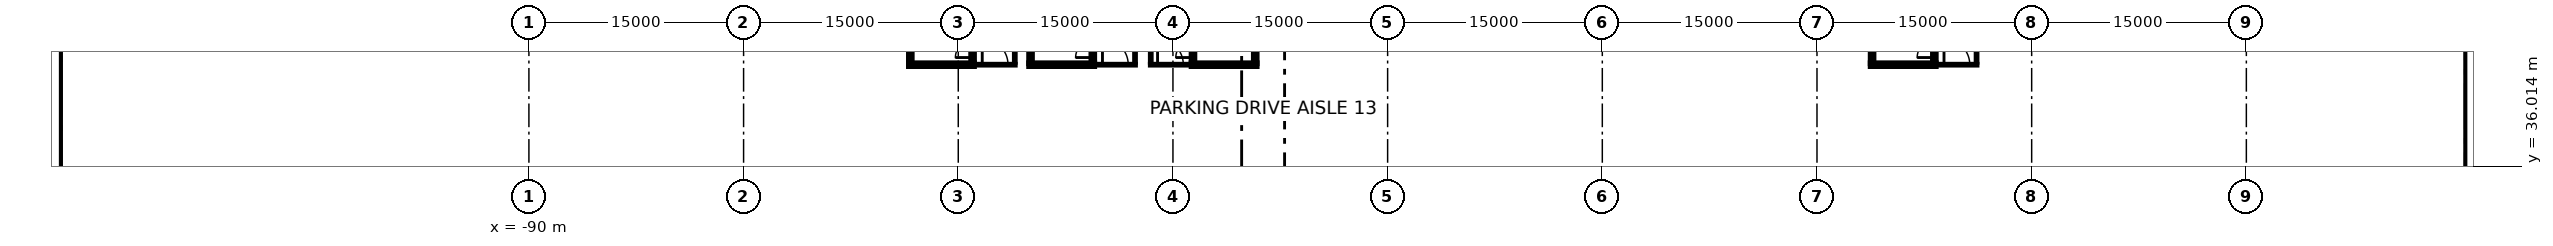
"""IFC4 building model, lengths in metres.
Left out: names, types, materials, properties, quantities, classifications, styles, units other than length and angle.
Written with IfcOpenShell. Run it as: python <this file> out.ifc"""

import sys

from ifc_helpers import new_model, si_unit, direction, frame, frame_2d, origin, place, context, subcontext, project, spatial, rectangle, extrude, element, fill, save


model = new_model("IFC4")
c1 = context("Model", 3, precision=1e-05, world=origin(), true_north=direction((0.0, 1.0)))
c2 = subcontext(c1, "Body", "Model", "MODEL_VIEW")
j1 = project(units=[si_unit("LENGTHUNIT", "METRE"), si_unit("PLANEANGLEUNIT", "RADIAN")], contexts=[c1])
p1 = place(None, origin())
s1 = spatial("IfcSite", under=j1, at=p1, CompositionType="ELEMENT")
p2 = place(p1, origin())
s2 = spatial("IfcBuilding", under=s1, at=p2, CompositionType="ELEMENT")
p3 = place(p2, frame((0.0, 0.0, -12.0)))
s3 = spatial("IfcBuildingStorey", under=s2, at=p3, CompositionType="ELEMENT", Elevation=-12.0)
for number, where, z_axis, x_axis in (
    (1, (-123.15, -80.0, 0.0), (0.0, 0.0, 1.0), (0.0, 1.0, 0.0)),
    (2, (45.75, -80.0, 0.0), (0.0, 0.0, 1.0), (0.0, 1.0, 0.0)),
):
    element("IfcWall", number, at=place(p3, frame(where, z_axis=z_axis, x_axis=x_axis)), inside=s3, PredefinedType="USERDEFINED", context=c2, shape_type="SweptSolid", body=[
        extrude(rectangle(XDim=160.0, YDim=0.9, at=frame_2d((80.0, 0.0))), origin(), (0.0, 0.0, 1.0), 11.55),
    ])
p4 = place(p2, frame((0.0, 0.0, -3.6)))
s4 = spatial("IfcBuildingStorey", under=s2, at=p4, CompositionType="ELEMENT", Elevation=-3.6)
p5 = place(p4, frame((-58.9, 43.1, 0.0), z_axis=(0.0, 0.0, 1.0), x_axis=(1.0, 0.0, 0.0)))
e3 = element("IfcWall", 3, at=p5, inside=s4, PredefinedType="PARTITIONING", context=c2, shape_type="SweptSolid", body=[
    extrude(rectangle(XDim=2.95, YDim=0.2, at=frame_2d((1.475, 0.0))), origin(), (0.0, 0.0, 1.0), 3.15),
])
p6 = place(p5, frame((0.575, 0.0, 0.0)))
e4 = element("IfcOpeningElement", 4, at=p6, cuts=e3, PredefinedType="OPENING", context=c2, shape_type="SweptSolid", body=[
    extrude(rectangle(XDim=1.8, YDim=2.1, at=frame_2d((0.9, 1.05))), frame((0.0, 0.11, 0.0), z_axis=(0.0, -1.0, 0.0), x_axis=(1.0, 0.0, 0.0)), (0.0, 0.0, 1.0), 0.22),
])
p7 = place(p4, frame((-56.05, 43.2, 0.0), z_axis=(0.0, 0.0, 1.0), x_axis=(0.0, 1.0, 0.0)))
e5 = element("IfcWall", 5, at=p7, inside=s4, PredefinedType="PARTITIONING", context=c2, shape_type="SweptSolid", body=[
    extrude(rectangle(XDim=3.6, YDim=0.2, at=frame_2d((1.8, 0.0))), origin(), (0.0, 0.0, 1.0), 3.15),
])
p8 = place(p4, frame((-50.5, 43.1, 0.0), z_axis=(0.0, 0.0, 1.0), x_axis=(1.0, 0.0, 0.0)))
e6 = element("IfcWall", 6, at=p8, inside=s4, PredefinedType="PARTITIONING", context=c2, shape_type="SweptSolid", body=[
    extrude(rectangle(XDim=2.95, YDim=0.2, at=frame_2d((1.475, 0.0))), origin(), (0.0, 0.0, 1.0), 3.15),
])
p9 = place(p8, frame((0.575, 0.0, 0.0)))
e7 = element("IfcOpeningElement", 7, at=p9, cuts=e6, PredefinedType="OPENING", context=c2, shape_type="SweptSolid", body=[
    extrude(rectangle(XDim=1.8, YDim=2.1, at=frame_2d((0.9, 1.05))), frame((0.0, 0.11, 0.0), z_axis=(0.0, -1.0, 0.0), x_axis=(1.0, 0.0, 0.0)), (0.0, 0.0, 1.0), 0.22),
])
p10 = place(p4, frame((-47.65, 43.2, 0.0), z_axis=(0.0, 0.0, 1.0), x_axis=(0.0, 1.0, 0.0)))
e8 = element("IfcWall", 8, at=p10, inside=s4, PredefinedType="PARTITIONING", context=c2, shape_type="SweptSolid", body=[
    extrude(rectangle(XDim=3.6, YDim=0.2, at=frame_2d((1.8, 0.0))), origin(), (0.0, 0.0, 1.0), 3.15),
])
p11 = place(p4, frame((8.3, 43.1, 0.0), z_axis=(0.0, 0.0, 1.0), x_axis=(1.0, 0.0, 0.0)))
e9 = element("IfcWall", 9, at=p11, inside=s4, PredefinedType="PARTITIONING", context=c2, shape_type="SweptSolid", body=[
    extrude(rectangle(XDim=2.95, YDim=0.2, at=frame_2d((1.475, 0.0))), origin(), (0.0, 0.0, 1.0), 3.15),
])
p12 = place(p11, frame((0.575, 0.0, 0.0)))
e10 = element("IfcOpeningElement", 10, at=p12, cuts=e9, PredefinedType="OPENING", context=c2, shape_type="SweptSolid", body=[
    extrude(rectangle(XDim=1.8, YDim=2.1, at=frame_2d((0.9, 1.05))), frame((0.0, 0.11, 0.0), z_axis=(0.0, -1.0, 0.0), x_axis=(1.0, 0.0, 0.0)), (0.0, 0.0, 1.0), 0.22),
])
p13 = place(p4, frame((11.15, 43.2, 0.0), z_axis=(0.0, 0.0, 1.0), x_axis=(0.0, 1.0, 0.0)))
e11 = element("IfcWall", 11, at=p13, inside=s4, PredefinedType="PARTITIONING", context=c2, shape_type="SweptSolid", body=[
    extrude(rectangle(XDim=3.6, YDim=0.2, at=frame_2d((1.8, 0.0))), origin(), (0.0, 0.0, 1.0), 3.15),
])
p14 = place(p4, frame((-46.65, 43.1, 0.0), z_axis=(0.0, 0.0, 1.0), x_axis=(1.0, 0.0, 0.0)))
e12 = element("IfcWall", 12, at=p14, inside=s4, PredefinedType="PARTITIONING", context=c2, shape_type="SweptSolid", body=[
    extrude(rectangle(XDim=2.95, YDim=0.2, at=frame_2d((1.475, 0.0))), origin(), (0.0, 0.0, 1.0), 3.15),
])
p15 = place(p14, frame((0.575, 0.0, 0.0)))
e13 = element("IfcOpeningElement", 13, at=p15, cuts=e12, PredefinedType="OPENING", context=c2, shape_type="SweptSolid", body=[
    extrude(rectangle(XDim=1.8, YDim=2.1, at=frame_2d((0.9, 1.05))), frame((0.0, 0.11, 0.0), z_axis=(0.0, -1.0, 0.0), x_axis=(1.0, 0.0, 0.0)), (0.0, 0.0, 1.0), 0.22),
])
p16 = place(p4, frame((-46.55, 43.2, 0.0), z_axis=(0.0, 0.0, 1.0), x_axis=(0.0, 1.0, 0.0)))
e14 = element("IfcWall", 14, at=p16, inside=s4, PredefinedType="PARTITIONING", context=c2, shape_type="SweptSolid", body=[
    extrude(rectangle(XDim=3.6, YDim=0.2, at=frame_2d((1.8, 0.0))), origin(), (0.0, 0.0, 1.0), 3.15),
])
p17 = place(p4, frame((-63.35, 43.2, 0.0), z_axis=(0.0, 0.0, 1.0), x_axis=(0.0, 1.0, 0.0)))
e15 = element("IfcWall", 15, at=p17, inside=s4, PredefinedType="SOLIDWALL", context=c2, shape_type="SweptSolid", body=[
    extrude(rectangle(XDim=9.6, YDim=0.2, at=frame_2d((4.8, 0.0))), origin(), (0.0, 0.0, 1.0), 3.15),
])
p18 = place(p4, frame((-59.0, 43.2, 0.0), z_axis=(0.0, 0.0, 1.0), x_axis=(0.0, 1.0, 0.0)))
e16 = element("IfcWall", 16, at=p18, inside=s4, PredefinedType="SOLIDWALL", context=c2, shape_type="SweptSolid", body=[
    extrude(rectangle(XDim=9.6, YDim=0.2, at=frame_2d((4.8, 0.0))), origin(), (0.0, 0.0, 1.0), 3.15),
])
p19 = place(p18, frame((0.4, 0.0, 0.0)))
e17 = element("IfcOpeningElement", 17, at=p19, cuts=e16, PredefinedType="OPENING", context=c2, shape_type="SweptSolid", body=[
    extrude(rectangle(XDim=1.2, YDim=2.1, at=frame_2d((0.6, 1.05))), frame((0.0, 0.11, 0.0), z_axis=(0.0, -1.0, 0.0), x_axis=(1.0, 0.0, 0.0)), (0.0, 0.0, 1.0), 0.22),
])
p20 = place(p4, frame((-58.9, 43.1, 0.0), z_axis=(0.0, 0.0, 1.0), x_axis=(-1.0, 0.0, 0.0)))
e18 = element("IfcWall", 18, at=p20, inside=s4, PredefinedType="SOLIDWALL", context=c2, shape_type="SweptSolid", body=[
    extrude(rectangle(XDim=4.55, YDim=0.2, at=frame_2d((2.275, 0.0))), origin(), (0.0, 0.0, 1.0), 3.15),
])
p21 = place(p4, frame((-54.95, 43.2, 0.0), z_axis=(0.0, 0.0, 1.0), x_axis=(0.0, 1.0, 0.0)))
e19 = element("IfcWall", 19, at=p21, inside=s4, PredefinedType="SOLIDWALL", context=c2, shape_type="SweptSolid", body=[
    extrude(rectangle(XDim=9.6, YDim=0.2, at=frame_2d((4.8, 0.0))), origin(), (0.0, 0.0, 1.0), 3.15),
])
p22 = place(p4, frame((-50.6, 43.2, 0.0), z_axis=(0.0, 0.0, 1.0), x_axis=(0.0, 1.0, 0.0)))
e20 = element("IfcWall", 20, at=p22, inside=s4, PredefinedType="SOLIDWALL", context=c2, shape_type="SweptSolid", body=[
    extrude(rectangle(XDim=9.6, YDim=0.2, at=frame_2d((4.8, 0.0))), origin(), (0.0, 0.0, 1.0), 3.15),
])
p23 = place(p22, frame((0.4, 0.0, 0.0)))
e21 = element("IfcOpeningElement", 21, at=p23, cuts=e20, PredefinedType="OPENING", context=c2, shape_type="SweptSolid", body=[
    extrude(rectangle(XDim=1.2, YDim=2.1, at=frame_2d((0.6, 1.05))), frame((0.0, 0.11, 0.0), z_axis=(0.0, -1.0, 0.0), x_axis=(1.0, 0.0, 0.0)), (0.0, 0.0, 1.0), 0.22),
])
p24 = place(p4, frame((-50.5, 43.1, 0.0), z_axis=(0.0, 0.0, 1.0), x_axis=(-1.0, 0.0, 0.0)))
e22 = element("IfcWall", 22, at=p24, inside=s4, PredefinedType="SOLIDWALL", context=c2, shape_type="SweptSolid", body=[
    extrude(rectangle(XDim=4.55, YDim=0.2, at=frame_2d((2.275, 0.0))), origin(), (0.0, 0.0, 1.0), 3.15),
])
p25 = place(p4, frame((3.85, 43.2, 0.0), z_axis=(0.0, 0.0, 1.0), x_axis=(0.0, 1.0, 0.0)))
e23 = element("IfcWall", 23, at=p25, inside=s4, PredefinedType="SOLIDWALL", context=c2, shape_type="SweptSolid", body=[
    extrude(rectangle(XDim=9.6, YDim=0.2, at=frame_2d((4.8, 0.0))), origin(), (0.0, 0.0, 1.0), 3.15),
])
p26 = place(p4, frame((8.2, 43.2, 0.0), z_axis=(0.0, 0.0, 1.0), x_axis=(0.0, 1.0, 0.0)))
e24 = element("IfcWall", 24, at=p26, inside=s4, PredefinedType="SOLIDWALL", context=c2, shape_type="SweptSolid", body=[
    extrude(rectangle(XDim=9.6, YDim=0.2, at=frame_2d((4.8, 0.0))), origin(), (0.0, 0.0, 1.0), 3.15),
])
p27 = place(p26, frame((0.4, 0.0, 0.0)))
e25 = element("IfcOpeningElement", 25, at=p27, cuts=e24, PredefinedType="OPENING", context=c2, shape_type="SweptSolid", body=[
    extrude(rectangle(XDim=1.2, YDim=2.1, at=frame_2d((0.6, 1.05))), frame((0.0, 0.11, 0.0), z_axis=(0.0, -1.0, 0.0), x_axis=(1.0, 0.0, 0.0)), (0.0, 0.0, 1.0), 0.22),
])
p28 = place(p4, frame((8.3, 43.1, 0.0), z_axis=(0.0, 0.0, 1.0), x_axis=(-1.0, 0.0, 0.0)))
e26 = element("IfcWall", 26, at=p28, inside=s4, PredefinedType="SOLIDWALL", context=c2, shape_type="SweptSolid", body=[
    extrude(rectangle(XDim=4.55, YDim=0.2, at=frame_2d((2.275, 0.0))), origin(), (0.0, 0.0, 1.0), 3.15),
])
p29 = place(p4, frame((-43.6, 43.2, 0.0), z_axis=(0.0, 0.0, 1.0), x_axis=(0.0, 1.0, 0.0)))
e27 = element("IfcWall", 27, at=p29, inside=s4, PredefinedType="SOLIDWALL", context=c2, shape_type="SweptSolid", body=[
    extrude(rectangle(XDim=9.6, YDim=0.2, at=frame_2d((4.8, 0.0))), origin(), (0.0, 0.0, 1.0), 3.15),
])
p30 = place(p29, frame((0.4, 0.0, 0.0)))
e28 = element("IfcOpeningElement", 28, at=p30, cuts=e27, PredefinedType="OPENING", context=c2, shape_type="SweptSolid", body=[
    extrude(rectangle(XDim=1.2, YDim=2.1, at=frame_2d((0.6, 1.05))), frame((0.0, 0.11, 0.0), z_axis=(0.0, -1.0, 0.0), x_axis=(1.0, 0.0, 0.0)), (0.0, 0.0, 1.0), 0.22),
])
p31 = place(p4, frame((-39.25, 43.2, 0.0), z_axis=(0.0, 0.0, 1.0), x_axis=(0.0, 1.0, 0.0)))
e29 = element("IfcWall", 29, at=p31, inside=s4, PredefinedType="SOLIDWALL", context=c2, shape_type="SweptSolid", body=[
    extrude(rectangle(XDim=9.6, YDim=0.2, at=frame_2d((4.8, 0.0))), origin(), (0.0, 0.0, 1.0), 3.15),
])
p32 = place(p4, frame((-39.15, 43.1, 0.0), z_axis=(0.0, 0.0, 1.0), x_axis=(-1.0, 0.0, 0.0)))
e30 = element("IfcWall", 30, at=p32, inside=s4, PredefinedType="SOLIDWALL", context=c2, shape_type="SweptSolid", body=[
    extrude(rectangle(XDim=4.55, YDim=0.2, at=frame_2d((2.275, 0.0))), origin(), (0.0, 0.0, 1.0), 3.15),
])
p33 = place(p6, origin())
e31 = element("IfcDoor", 31, at=p33, inside=s4, OperationType="DOUBLE_DOOR_SINGLE_SWING", PredefinedType="DOOR", context=c2, shape_type="SweptSolid", body=[
    extrude(rectangle(XDim=1.8, YDim=2.1, at=frame_2d((0.9, 1.05))), frame((0.0, 0.025, 0.0), z_axis=(0.0, -1.0, 0.0), x_axis=(1.0, 0.0, 0.0)), (0.0, 0.0, 1.0), 0.05),
])
fill(e4, e31)
p34 = place(p9, origin())
e32 = element("IfcDoor", 32, at=p34, inside=s4, OperationType="DOUBLE_DOOR_SINGLE_SWING", PredefinedType="DOOR", context=c2, shape_type="SweptSolid", body=[
    extrude(rectangle(XDim=1.8, YDim=2.1, at=frame_2d((0.9, 1.05))), frame((0.0, 0.025, 0.0), z_axis=(0.0, -1.0, 0.0), x_axis=(1.0, 0.0, 0.0)), (0.0, 0.0, 1.0), 0.05),
])
fill(e7, e32)
p35 = place(p12, origin())
e33 = element("IfcDoor", 33, at=p35, inside=s4, OperationType="DOUBLE_DOOR_SINGLE_SWING", PredefinedType="DOOR", context=c2, shape_type="SweptSolid", body=[
    extrude(rectangle(XDim=1.8, YDim=2.1, at=frame_2d((0.9, 1.05))), frame((0.0, 0.025, 0.0), z_axis=(0.0, -1.0, 0.0), x_axis=(1.0, 0.0, 0.0)), (0.0, 0.0, 1.0), 0.05),
])
fill(e10, e33)
p36 = place(p15, origin())
e34 = element("IfcDoor", 34, at=p36, inside=s4, OperationType="DOUBLE_DOOR_SINGLE_SWING", PredefinedType="DOOR", context=c2, shape_type="SweptSolid", body=[
    extrude(rectangle(XDim=1.8, YDim=2.1, at=frame_2d((0.9, 1.05))), frame((0.0, 0.025, 0.0), z_axis=(0.0, -1.0, 0.0), x_axis=(1.0, 0.0, 0.0)), (0.0, 0.0, 1.0), 0.05),
])
fill(e13, e34)
p37 = place(p19, origin())
e35 = element("IfcDoor", 35, at=p37, inside=s4, OperationType="SINGLE_SWING_LEFT", PredefinedType="DOOR", context=c2, shape_type="SweptSolid", body=[
    extrude(rectangle(XDim=1.2, YDim=2.1, at=frame_2d((0.6, 1.05))), frame((0.0, 0.025, 0.0), z_axis=(0.0, -1.0, 0.0), x_axis=(1.0, 0.0, 0.0)), (0.0, 0.0, 1.0), 0.05),
])
fill(e17, e35)
p38 = place(p23, origin())
e36 = element("IfcDoor", 36, at=p38, inside=s4, OperationType="SINGLE_SWING_LEFT", PredefinedType="DOOR", context=c2, shape_type="SweptSolid", body=[
    extrude(rectangle(XDim=1.2, YDim=2.1, at=frame_2d((0.6, 1.05))), frame((0.0, 0.025, 0.0), z_axis=(0.0, -1.0, 0.0), x_axis=(1.0, 0.0, 0.0)), (0.0, 0.0, 1.0), 0.05),
])
fill(e21, e36)
p39 = place(p27, origin())
e37 = element("IfcDoor", 37, at=p39, inside=s4, OperationType="SINGLE_SWING_LEFT", PredefinedType="DOOR", context=c2, shape_type="SweptSolid", body=[
    extrude(rectangle(XDim=1.2, YDim=2.1, at=frame_2d((0.6, 1.05))), frame((0.0, 0.025, 0.0), z_axis=(0.0, -1.0, 0.0), x_axis=(1.0, 0.0, 0.0)), (0.0, 0.0, 1.0), 0.05),
])
fill(e25, e37)
p40 = place(p30, origin())
e38 = element("IfcDoor", 38, at=p40, inside=s4, OperationType="SINGLE_SWING_LEFT", PredefinedType="DOOR", context=c2, shape_type="SweptSolid", body=[
    extrude(rectangle(XDim=1.2, YDim=2.1, at=frame_2d((0.6, 1.05))), frame((0.0, 0.025, 0.0), z_axis=(0.0, -1.0, 0.0), x_axis=(1.0, 0.0, 0.0)), (0.0, 0.0, 1.0), 0.05),
])
fill(e28, e38)
save(model, sys.argv[1])
